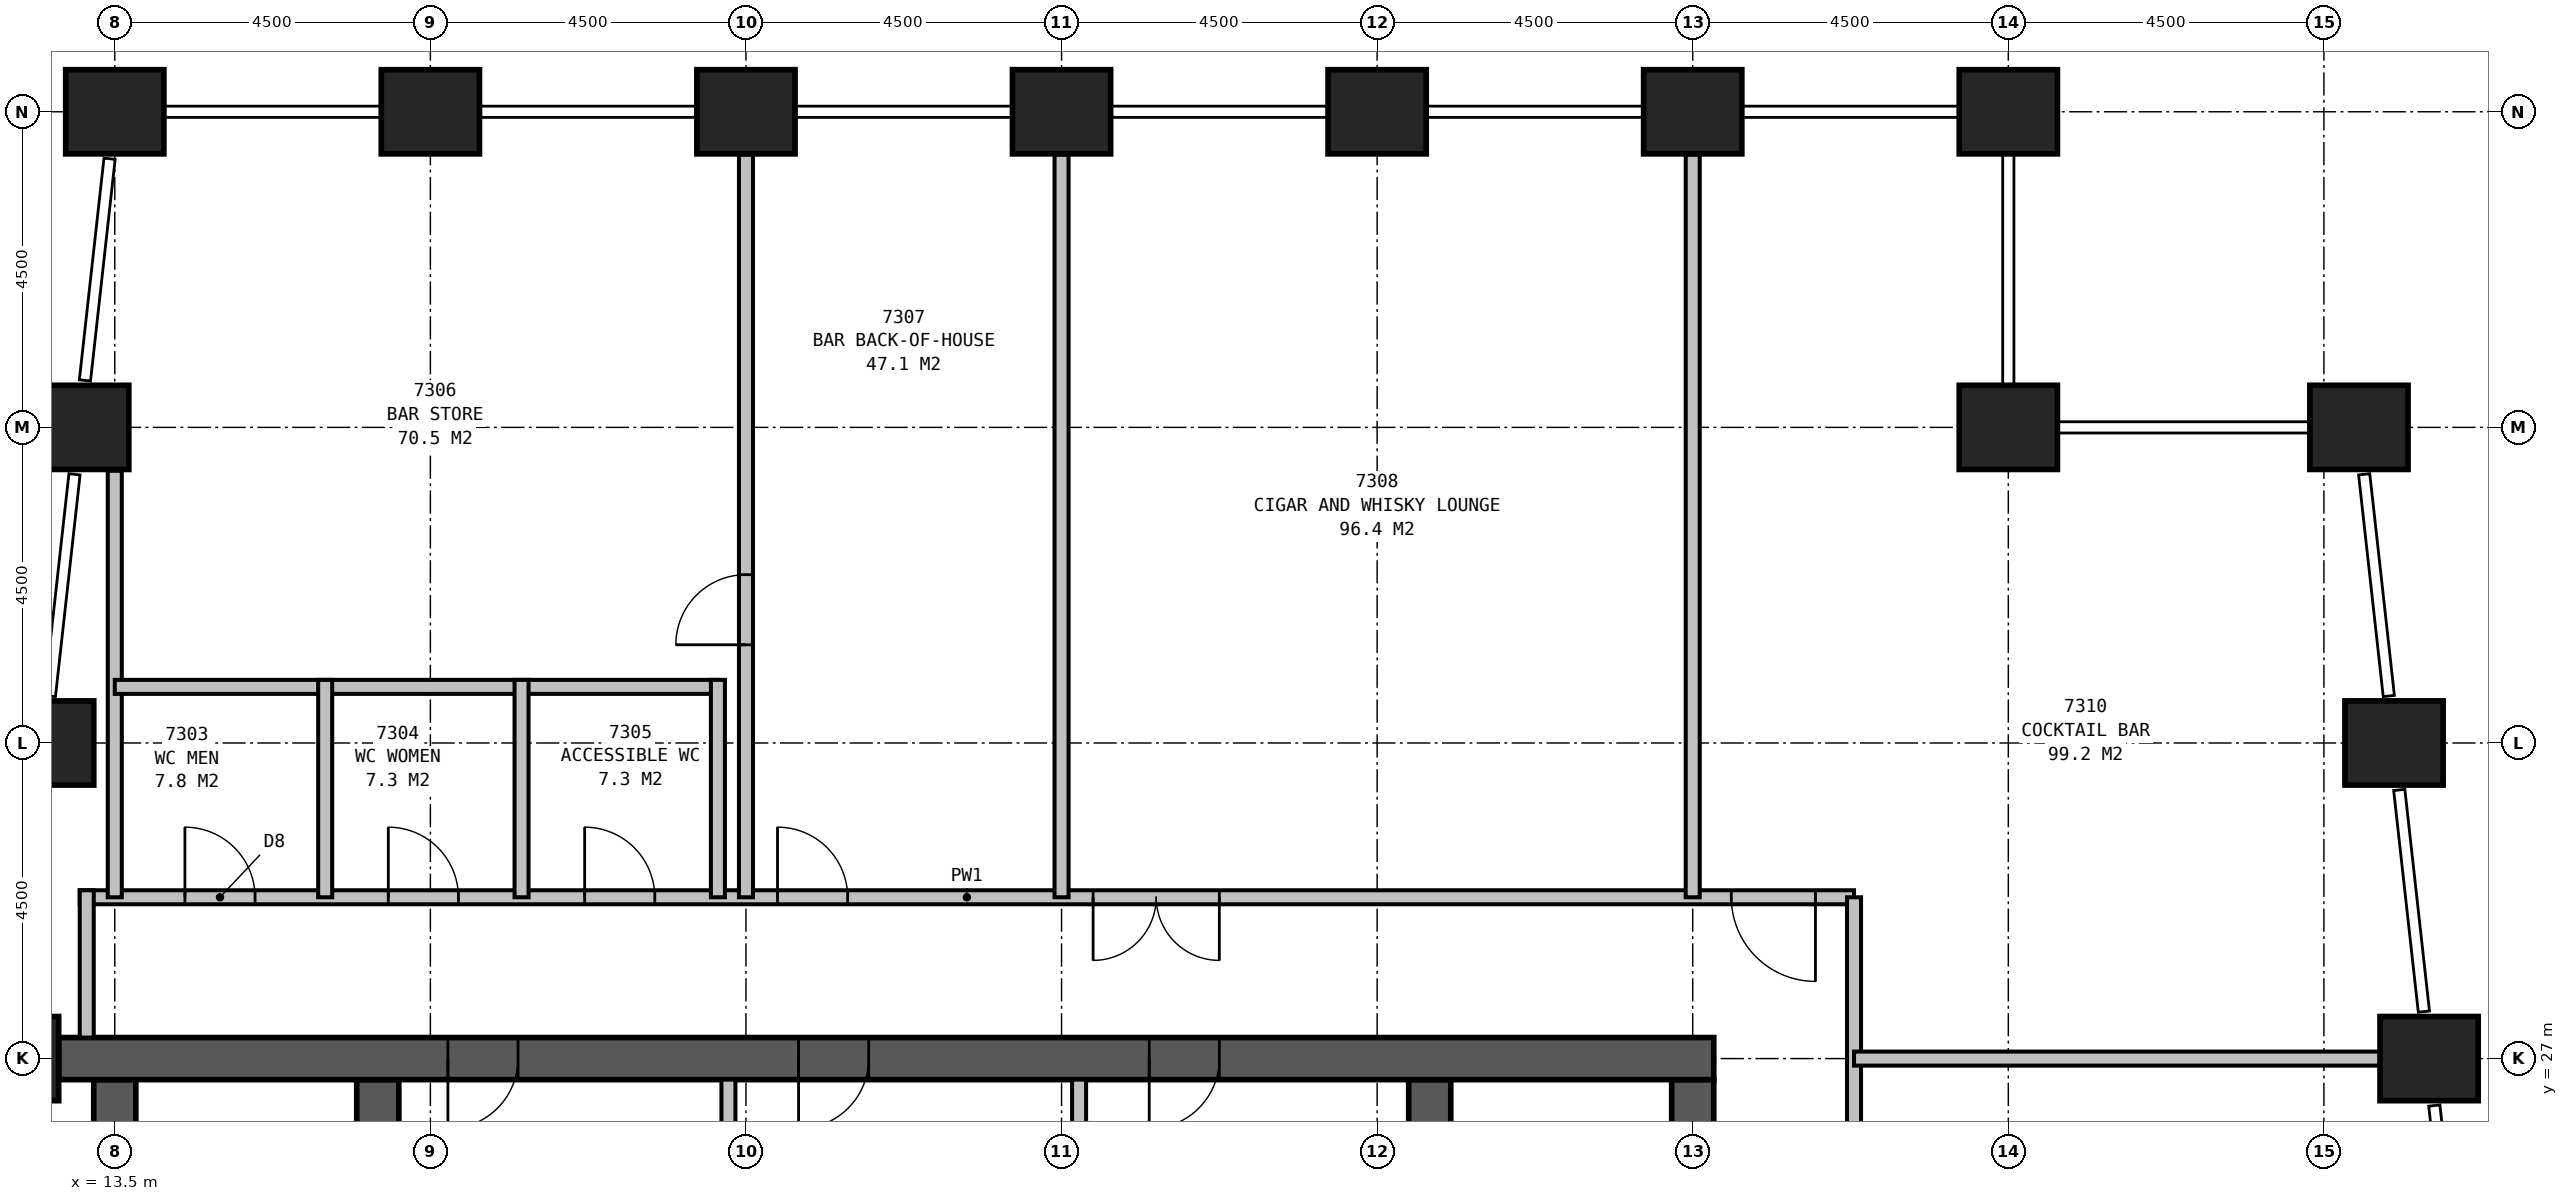
"""IFC4 building model, lengths in metres.
Left out: names, types, materials, properties, quantities, classifications, styles, units other than length and angle.
Written with IfcOpenShell. Run it as: python <this file> out.ifc"""

import sys

from ifc_helpers import new_model, si_unit, direction, frame, frame_2d, origin, origin_2d, place, context, subcontext, project, spatial, rectangle, extrude, element, fill, save


model = new_model("IFC4")
c1 = context("Model", 3, precision=1e-05, world=origin(), true_north=direction((0.0, 1.0)))
c2 = subcontext(c1, "Body", "Model", "MODEL_VIEW")
j1 = project(units=[si_unit("LENGTHUNIT", "METRE"), si_unit("PLANEANGLEUNIT", "RADIAN")], contexts=[c1])
p1 = place(None, origin())
s1 = spatial("IfcSite", under=j1, at=p1, CompositionType="ELEMENT")
p2 = place(p1, origin())
s2 = spatial("IfcBuilding", under=s1, at=p2, CompositionType="ELEMENT")
p3 = place(p2, frame((0.0, 0.0, 285.8)))
s3 = spatial("IfcBuildingStorey", under=s2, at=p3, CompositionType="ELEMENT", Elevation=285.8)
for number, where, z_axis, x_axis in (
    (1, (46.5, 27.0, 0.0), (0.0, 0.0, 1.0), (1.0, 0.0, 0.0)),
    (2, (46.0, 31.5, 0.0), (0.0, 0.0, 1.0), (1.0, 0.0, 0.0)),
    (3, (45.5, 36.0, 0.0), (0.0, 0.0, 1.0), (1.0, 0.0, 0.0)),
    (4, (40.5, 36.0, 0.0), (0.0, 0.0, 1.0), (1.0, 0.0, 0.0)),
    (5, (40.5, 40.5, 0.0), (0.0, 0.0, 1.0), (1.0, 0.0, 0.0)),
    (6, (36.0, 40.5, 0.0), (0.0, 0.0, 1.0), (1.0, 0.0, 0.0)),
    (7, (31.5, 40.5, 0.0), (0.0, 0.0, 1.0), (1.0, 0.0, 0.0)),
    (8, (27.0, 40.5, 0.0), (0.0, 0.0, 1.0), (1.0, 0.0, 0.0)),
    (9, (22.5, 40.5, 0.0), (0.0, 0.0, 1.0), (1.0, 0.0, 0.0)),
    (10, (18.0, 40.5, 0.0), (0.0, 0.0, 1.0), (1.0, 0.0, 0.0)),
    (11, (13.5, 40.5, 0.0), (0.0, 0.0, 1.0), (1.0, 0.0, 0.0)),
    (12, (13.0, 36.0, 0.0), (0.0, 0.0, 1.0), (1.0, 0.0, 0.0)),
    (13, (12.5, 31.5, 0.0), (0.0, 0.0, 1.0), (1.0, 0.0, 0.0)),
    (14, (12.0, 27.0, 0.0), (0.0, 0.0, 1.0), (1.0, 0.0, 0.0)),
):
    element("IfcColumn", number, at=place(p3, frame(where, z_axis=z_axis, x_axis=x_axis)), inside=s3, PredefinedType="COLUMN", context=c2, shape_type="SweptSolid", body=[
        extrude(rectangle(XDim=1.4, YDim=1.2, at=origin_2d()), origin(), (0.0, 0.0, 1.0), 3.9),
    ])
p4 = place(p3, frame((36.3, 27.0, 0.0), z_axis=(0.0, 0.0, 1.0), x_axis=(-1.0, 0.0, 0.0)))
e15 = element("IfcWall", 15, at=p4, inside=s3, PredefinedType="SHEAR", context=c2, shape_type="SweptSolid", body=[
    extrude(rectangle(XDim=23.6, YDim=0.6, at=frame_2d((11.8, 0.0))), origin(), (0.0, 0.0, 1.0), 3.9),
])
p5 = place(p4, frame((17.05, 0.0, 0.0)))
e16 = element("IfcOpeningElement", 16, at=p5, cuts=e15, PredefinedType="OPENING", context=c2, shape_type="SweptSolid", body=[
    extrude(rectangle(XDim=1.0, YDim=2.1, at=frame_2d((0.5, 1.05))), frame((0.0, 0.31, 0.0), z_axis=(0.0, -1.0, 0.0), x_axis=(1.0, 0.0, 0.0)), (0.0, 0.0, 1.0), 0.62),
])
p6 = place(p4, frame((12.05, 0.0, 0.0)))
e17 = element("IfcOpeningElement", 17, at=p6, cuts=e15, PredefinedType="OPENING", context=c2, shape_type="SweptSolid", body=[
    extrude(rectangle(XDim=1.0, YDim=2.1, at=frame_2d((0.5, 1.05))), frame((0.0, 0.31, 0.0), z_axis=(0.0, -1.0, 0.0), x_axis=(1.0, 0.0, 0.0)), (0.0, 0.0, 1.0), 0.62),
])
p7 = place(p4, frame((7.05, 0.0, 0.0)))
e18 = element("IfcOpeningElement", 18, at=p7, cuts=e15, PredefinedType="OPENING", context=c2, shape_type="SweptSolid", body=[
    extrude(rectangle(XDim=1.0, YDim=2.1, at=frame_2d((0.5, 1.05))), frame((0.0, 0.31, 0.0), z_axis=(0.0, -1.0, 0.0), x_axis=(1.0, 0.0, 0.0)), (0.0, 0.0, 1.0), 0.62),
])
p8 = place(p3, frame((17.25, 13.8, 0.0), z_axis=(0.0, 0.0, 1.0), x_axis=(0.0, 1.0, 0.0)))
e19 = element("IfcWall", 19, at=p8, inside=s3, PredefinedType="SHEAR", context=c2, shape_type="SweptSolid", body=[
    extrude(rectangle(XDim=12.9, YDim=0.6, at=frame_2d((6.45, 0.0))), origin(), (0.0, 0.0, 1.0), 3.9),
])
p9 = place(p8, frame((3.85, 0.0, 0.0)))
e20 = element("IfcOpeningElement", 20, at=p9, cuts=e19, PredefinedType="OPENING", context=c2, shape_type="SweptSolid", body=[
    extrude(rectangle(XDim=1.2, YDim=2.1, at=frame_2d((0.6, 1.05))), frame((0.0, 0.31, 0.0), z_axis=(0.0, -1.0, 0.0), x_axis=(1.0, 0.0, 0.0)), (0.0, 0.0, 1.0), 0.62),
])
p10 = place(p3, frame((32.25, 13.8, 0.0), z_axis=(0.0, 0.0, 1.0), x_axis=(0.0, 1.0, 0.0)))
e21 = element("IfcWall", 21, at=p10, inside=s3, PredefinedType="SHEAR", context=c2, shape_type="SweptSolid", body=[
    extrude(rectangle(XDim=12.9, YDim=0.6, at=frame_2d((6.45, 0.0))), origin(), (0.0, 0.0, 1.0), 3.9),
])
p11 = place(p10, frame((5.05, 0.0, 0.0), z_axis=(0.0, 0.0, 1.0), x_axis=(-1.0, 0.0, 0.0)))
e22 = element("IfcOpeningElement", 22, at=p11, cuts=e21, PredefinedType="OPENING", context=c2, shape_type="SweptSolid", body=[
    extrude(rectangle(XDim=1.2, YDim=2.1, at=frame_2d((0.6, 1.05))), frame((0.0, 0.31, 0.0), z_axis=(0.0, -1.0, 0.0), x_axis=(1.0, 0.0, 0.0)), (0.0, 0.0, 1.0), 0.62),
])
for number, where, z_axis, x_axis in (
    (23, (13.5, 26.7, 0.0), (0.0, 0.0, 1.0), (0.0, -1.0, 0.0)),
    (24, (36.0, 20.0, 0.0), (0.0, 0.0, 1.0), (0.0, 1.0, 0.0)),
):
    element("IfcWall", number, at=place(p3, frame(where, z_axis=z_axis, x_axis=x_axis)), inside=s3, PredefinedType="SHEAR", context=c2, shape_type="SweptSolid", body=[
        extrude(rectangle(XDim=6.7, YDim=0.6, at=frame_2d((3.35, 0.0))), origin(), (0.0, 0.0, 1.0), 3.9),
    ])
p12 = place(p3, frame((38.3, 11.2, 0.0), z_axis=(0.0, 0.0, 1.0), x_axis=(0.0, 1.0, 0.0)))
e25 = element("IfcWall", 25, at=p12, inside=s3, PredefinedType="PARTITIONING", context=c2, shape_type="SweptSolid", body=[
    extrude(rectangle(XDim=18.1, YDim=0.2, at=frame_2d((9.05, 0.0))), origin(), (0.0, 0.0, 1.0), 3.65),
])
p13 = place(p12, frame((3.75, 0.0, 0.0), z_axis=(0.0, 0.0, 1.0), x_axis=(-1.0, 0.0, 0.0)))
e26 = element("IfcOpeningElement", 26, at=p13, cuts=e25, PredefinedType="OPENING", context=c2, shape_type="SweptSolid", body=[
    extrude(rectangle(XDim=1.0, YDim=2.1, at=frame_2d((0.5, 1.05))), frame((0.0, 0.11, 0.0), z_axis=(0.0, -1.0, 0.0), x_axis=(1.0, 0.0, 0.0)), (0.0, 0.0, 1.0), 0.22),
])
p14 = place(p12, frame((9.05, 0.0, 0.0), z_axis=(0.0, 0.0, 1.0), x_axis=(-1.0, 0.0, 0.0)))
e27 = element("IfcOpeningElement", 27, at=p14, cuts=e25, PredefinedType="OPENING", context=c2, shape_type="SweptSolid", body=[
    extrude(rectangle(XDim=1.8, YDim=2.4, at=frame_2d((0.9, 1.2))), frame((0.0, 0.11, 0.0), z_axis=(0.0, -1.0, 0.0), x_axis=(1.0, 0.0, 0.0)), (0.0, 0.0, 1.0), 0.22),
])
p15 = place(p3, frame((13.0, 29.3, 0.0), z_axis=(0.0, 0.0, 1.0), x_axis=(1.0, 0.0, 0.0)))
e28 = element("IfcWall", 28, at=p15, inside=s3, PredefinedType="PARTITIONING", context=c2, shape_type="SweptSolid", body=[
    extrude(rectangle(XDim=25.3, YDim=0.2, at=frame_2d((12.65, 0.0))), origin(), (0.0, 0.0, 1.0), 3.65),
])
p16 = place(p15, frame((1.5, 0.0, 0.0)))
e29 = element("IfcOpeningElement", 29, at=p16, cuts=e28, PredefinedType="OPENING", context=c2, shape_type="SweptSolid", body=[
    extrude(rectangle(XDim=1.0, YDim=2.1, at=frame_2d((0.5, 1.05))), frame((0.0, 0.11, 0.0), z_axis=(0.0, -1.0, 0.0), x_axis=(1.0, 0.0, 0.0)), (0.0, 0.0, 1.0), 0.22),
])
p17 = place(p15, frame((4.4, 0.0, 0.0)))
e30 = element("IfcOpeningElement", 30, at=p17, cuts=e28, PredefinedType="OPENING", context=c2, shape_type="SweptSolid", body=[
    extrude(rectangle(XDim=1.0, YDim=2.1, at=frame_2d((0.5, 1.05))), frame((0.0, 0.11, 0.0), z_axis=(0.0, -1.0, 0.0), x_axis=(1.0, 0.0, 0.0)), (0.0, 0.0, 1.0), 0.22),
])
p18 = place(p15, frame((7.2, 0.0, 0.0)))
e31 = element("IfcOpeningElement", 31, at=p18, cuts=e28, PredefinedType="OPENING", context=c2, shape_type="SweptSolid", body=[
    extrude(rectangle(XDim=1.0, YDim=2.1, at=frame_2d((0.5, 1.05))), frame((0.0, 0.11, 0.0), z_axis=(0.0, -1.0, 0.0), x_axis=(1.0, 0.0, 0.0)), (0.0, 0.0, 1.0), 0.22),
])
p19 = place(p15, frame((9.95, 0.0, 0.0)))
e32 = element("IfcOpeningElement", 32, at=p19, cuts=e28, PredefinedType="OPENING", context=c2, shape_type="SweptSolid", body=[
    extrude(rectangle(XDim=1.0, YDim=2.1, at=frame_2d((0.5, 1.05))), frame((0.0, 0.11, 0.0), z_axis=(0.0, -1.0, 0.0), x_axis=(1.0, 0.0, 0.0)), (0.0, 0.0, 1.0), 0.22),
])
p20 = place(p15, frame((16.25, 0.0, 0.0), z_axis=(0.0, 0.0, 1.0), x_axis=(-1.0, 0.0, 0.0)))
e33 = element("IfcOpeningElement", 33, at=p20, cuts=e28, PredefinedType="OPENING", context=c2, shape_type="SweptSolid", body=[
    extrude(rectangle(XDim=1.8, YDim=2.4, at=frame_2d((0.9, 1.2))), frame((0.0, 0.11, 0.0), z_axis=(0.0, -1.0, 0.0), x_axis=(1.0, 0.0, 0.0)), (0.0, 0.0, 1.0), 0.22),
])
p21 = place(p15, frame((24.75, 0.0, 0.0), z_axis=(0.0, 0.0, 1.0), x_axis=(-1.0, 0.0, 0.0)))
e34 = element("IfcOpeningElement", 34, at=p21, cuts=e28, PredefinedType="OPENING", context=c2, shape_type="SweptSolid", body=[
    extrude(rectangle(XDim=1.2, YDim=2.1, at=frame_2d((0.6, 1.05))), frame((0.0, 0.11, 0.0), z_axis=(0.0, -1.0, 0.0), x_axis=(1.0, 0.0, 0.0)), (0.0, 0.0, 1.0), 0.22),
])
p22 = place(p3, frame((38.3, 27.0, 0.0), z_axis=(0.0, 0.0, 1.0), x_axis=(1.0, 0.0, 0.0)))
e35 = element("IfcWall", 35, at=p22, inside=s3, PredefinedType="PARTITIONING", context=c2, shape_type="SweptSolid", body=[
    extrude(rectangle(XDim=7.499, YDim=0.2, at=frame_2d((3.75, 0.0))), origin(), (0.0, 0.0, 1.0), 2.3),
])
p23 = place(p3, frame((13.5, 29.3, 0.0), z_axis=(0.0, 0.0, 1.0), x_axis=(0.0, 1.0, 0.0)))
e36 = element("IfcWall", 36, at=p23, inside=s3, PredefinedType="PARTITIONING", context=c2, shape_type="SweptSolid", body=[
    extrude(rectangle(XDim=6.082, YDim=0.2, at=frame_2d((3.041, 0.0))), origin(), (0.0, 0.0, 1.0), 2.6),
])
p24 = place(p3, frame((22.5, 29.3, 0.0), z_axis=(0.0, 0.0, 1.0), x_axis=(0.0, 1.0, 0.0)))
e37 = element("IfcWall", 37, at=p24, inside=s3, PredefinedType="PARTITIONING", context=c2, shape_type="SweptSolid", body=[
    extrude(rectangle(XDim=10.59, YDim=0.2, at=frame_2d((5.295, 0.0))), origin(), (0.0, 0.0, 1.0), 2.6),
])
p25 = place(p24, frame((3.6, 0.0, 0.0)))
e38 = element("IfcOpeningElement", 38, at=p25, cuts=e37, PredefinedType="OPENING", context=c2, shape_type="SweptSolid", body=[
    extrude(rectangle(XDim=1.0, YDim=2.1, at=frame_2d((0.5, 1.05))), frame((0.0, 0.11, 0.0), z_axis=(0.0, -1.0, 0.0), x_axis=(1.0, 0.0, 0.0)), (0.0, 0.0, 1.0), 0.22),
])
for number, where, z_axis, x_axis in (
    (39, (27.0, 29.3, 0.0), (0.0, 0.0, 1.0), (0.0, 1.0, 0.0)),
    (40, (36.0, 29.3, 0.0), (0.0, 0.0, 1.0), (0.0, 1.0, 0.0)),
):
    element("IfcWall", number, at=place(p3, frame(where, z_axis=z_axis, x_axis=x_axis)), inside=s3, PredefinedType="PARTITIONING", context=c2, shape_type="SweptSolid", body=[
        extrude(rectangle(XDim=10.59, YDim=0.2, at=frame_2d((5.295, 0.0))), origin(), (0.0, 0.0, 1.0), 2.6),
    ])
for number, where, z_axis, x_axis in (
    (41, (16.5, 29.3, 0.0), (0.0, 0.0, 1.0), (0.0, 1.0, 0.0)),
    (42, (19.3, 29.3, 0.0), (0.0, 0.0, 1.0), (0.0, 1.0, 0.0)),
):
    element("IfcWall", number, at=place(p3, frame(where, z_axis=z_axis, x_axis=x_axis)), inside=s3, PredefinedType="PARTITIONING", context=c2, shape_type="SweptSolid", body=[
        extrude(rectangle(XDim=3.1, YDim=0.2, at=frame_2d((1.55, 0.0))), origin(), (0.0, 0.0, 1.0), 3.65),
    ])
p26 = place(p3, frame((22.1, 29.3, 0.0), z_axis=(0.0, 0.0, 1.0), x_axis=(0.0, 1.0, 0.0)))
e43 = element("IfcWall", 43, at=p26, inside=s3, PredefinedType="PARTITIONING", context=c2, shape_type="SweptSolid", body=[
    extrude(rectangle(XDim=3.1, YDim=0.2, at=frame_2d((1.55, 0.0))), origin(), (0.0, 0.0, 1.0), 2.6),
])
p27 = place(p3, frame((13.5, 32.3, 0.0), z_axis=(0.0, 0.0, 1.0), x_axis=(1.0, 0.0, 0.0)))
e44 = element("IfcWall", 44, at=p27, inside=s3, PredefinedType="PARTITIONING", context=c2, shape_type="SweptSolid", body=[
    extrude(rectangle(XDim=8.6, YDim=0.2, at=frame_2d((4.3, 0.0))), origin(), (0.0, 0.0, 1.0), 3.65),
])
p28 = place(p3, frame((13.1, 27.3, 0.0), z_axis=(0.0, 0.0, 1.0), x_axis=(0.0, 1.0, 0.0)))
e45 = element("IfcWall", 45, at=p28, inside=s3, PredefinedType="PARTITIONING", context=c2, shape_type="SweptSolid", body=[
    extrude(rectangle(XDim=2.1, YDim=0.2, at=frame_2d((1.05, 0.0))), origin(), (0.0, 0.0, 1.0), 3.65),
])
for number, where, z_axis, x_axis in (
    (46, (22.25, 23.6, 0.0), (0.0, 0.0, 1.0), (0.0, 1.0, 0.0)),
    (47, (27.25, 23.6, 0.0), (0.0, 0.0, 1.0), (0.0, 1.0, 0.0)),
):
    element("IfcWall", number, at=place(p3, frame(where, z_axis=z_axis, x_axis=x_axis)), inside=s3, PredefinedType="PARTITIONING", context=c2, shape_type="SweptSolid", body=[
        extrude(rectangle(XDim=3.1, YDim=0.2, at=frame_2d((1.55, 0.0))), origin(), (0.0, 0.0, 1.0), 3.65),
    ])
p29 = place(p16, origin())
e48 = element("IfcDoor", 48, at=p29, inside=s3, OperationType="SINGLE_SWING_LEFT", PredefinedType="DOOR", context=c2, shape_type="SweptSolid", body=[
    extrude(rectangle(XDim=1.0, YDim=2.1, at=frame_2d((0.5, 1.05))), frame((0.0, 0.025, 0.0), z_axis=(0.0, -1.0, 0.0), x_axis=(1.0, 0.0, 0.0)), (0.0, 0.0, 1.0), 0.05),
])
fill(e29, e48)
p30 = place(p17, origin())
e49 = element("IfcDoor", 49, at=p30, inside=s3, OperationType="SINGLE_SWING_LEFT", PredefinedType="DOOR", context=c2, shape_type="SweptSolid", body=[
    extrude(rectangle(XDim=1.0, YDim=2.1, at=frame_2d((0.5, 1.05))), frame((0.0, 0.025, 0.0), z_axis=(0.0, -1.0, 0.0), x_axis=(1.0, 0.0, 0.0)), (0.0, 0.0, 1.0), 0.05),
])
fill(e30, e49)
p31 = place(p18, origin())
e50 = element("IfcDoor", 50, at=p31, inside=s3, OperationType="SINGLE_SWING_LEFT", PredefinedType="DOOR", context=c2, shape_type="SweptSolid", body=[
    extrude(rectangle(XDim=1.0, YDim=2.1, at=frame_2d((0.5, 1.05))), frame((0.0, 0.025, 0.0), z_axis=(0.0, -1.0, 0.0), x_axis=(1.0, 0.0, 0.0)), (0.0, 0.0, 1.0), 0.05),
])
fill(e31, e50)
p32 = place(p19, origin())
e51 = element("IfcDoor", 51, at=p32, inside=s3, OperationType="SINGLE_SWING_LEFT", PredefinedType="DOOR", context=c2, shape_type="SweptSolid", body=[
    extrude(rectangle(XDim=1.0, YDim=2.1, at=frame_2d((0.5, 1.05))), frame((0.0, 0.025, 0.0), z_axis=(0.0, -1.0, 0.0), x_axis=(1.0, 0.0, 0.0)), (0.0, 0.0, 1.0), 0.05),
])
fill(e32, e51)
p33 = place(p20, origin())
e52 = element("IfcDoor", 52, at=p33, inside=s3, OperationType="DOUBLE_DOOR_SINGLE_SWING", PredefinedType="DOOR", context=c2, shape_type="SweptSolid", body=[
    extrude(rectangle(XDim=1.8, YDim=2.4, at=frame_2d((0.9, 1.2))), frame((0.0, 0.025, 0.0), z_axis=(0.0, -1.0, 0.0), x_axis=(1.0, 0.0, 0.0)), (0.0, 0.0, 1.0), 0.05),
])
fill(e33, e52)
p34 = place(p21, origin())
e53 = element("IfcDoor", 53, at=p34, inside=s3, OperationType="SINGLE_SWING_LEFT", PredefinedType="DOOR", context=c2, shape_type="SweptSolid", body=[
    extrude(rectangle(XDim=1.2, YDim=2.1, at=frame_2d((0.6, 1.05))), frame((0.0, 0.025, 0.0), z_axis=(0.0, -1.0, 0.0), x_axis=(1.0, 0.0, 0.0)), (0.0, 0.0, 1.0), 0.05),
])
fill(e34, e53)
p35 = place(p25, origin())
e54 = element("IfcDoor", 54, at=p35, inside=s3, OperationType="SINGLE_SWING_LEFT", PredefinedType="DOOR", context=c2, shape_type="SweptSolid", body=[
    extrude(rectangle(XDim=1.0, YDim=2.1, at=frame_2d((0.5, 1.05))), frame((0.0, 0.025, 0.0), z_axis=(0.0, -1.0, 0.0), x_axis=(1.0, 0.0, 0.0)), (0.0, 0.0, 1.0), 0.05),
])
fill(e38, e54)
p36 = place(p5, origin())
e55 = element("IfcDoor", 55, at=p36, inside=s3, OperationType="SINGLE_SWING_RIGHT", PredefinedType="DOOR", context=c2, shape_type="SweptSolid", body=[
    extrude(rectangle(XDim=1.0, YDim=2.1, at=frame_2d((0.5, 1.05))), frame((0.0, 0.3, 0.0), z_axis=(0.0, -1.0, 0.0), x_axis=(1.0, 0.0, 0.0)), (0.0, 0.0, 1.0), 0.6),
])
fill(e16, e55)
p37 = place(p6, origin())
e56 = element("IfcDoor", 56, at=p37, inside=s3, OperationType="SINGLE_SWING_RIGHT", PredefinedType="DOOR", context=c2, shape_type="SweptSolid", body=[
    extrude(rectangle(XDim=1.0, YDim=2.1, at=frame_2d((0.5, 1.05))), frame((0.0, 0.3, 0.0), z_axis=(0.0, -1.0, 0.0), x_axis=(1.0, 0.0, 0.0)), (0.0, 0.0, 1.0), 0.6),
])
fill(e17, e56)
p38 = place(p7, origin())
e57 = element("IfcDoor", 57, at=p38, inside=s3, OperationType="SINGLE_SWING_RIGHT", PredefinedType="DOOR", context=c2, shape_type="SweptSolid", body=[
    extrude(rectangle(XDim=1.0, YDim=2.1, at=frame_2d((0.5, 1.05))), frame((0.0, 0.3, 0.0), z_axis=(0.0, -1.0, 0.0), x_axis=(1.0, 0.0, 0.0)), (0.0, 0.0, 1.0), 0.6),
])
fill(e18, e57)
save(model, sys.argv[1])
